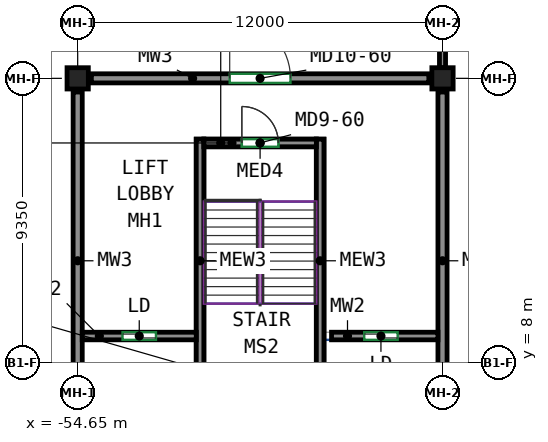
"""IFC4 building model, lengths in metres.
Left out: names, types, materials, properties, quantities, classifications, styles, units other than length and angle.
Written with IfcOpenShell. Run it as: python <this file> out.ifc"""

import sys

from ifc_helpers import new_model, si_unit, direction, frame, frame_2d, origin, origin_2d, place, context, subcontext, project, spatial, rectangle, extrude, source, transform, mapped, element, fill, save


model = new_model("IFC4")
c1 = context("Model", 3, precision=1e-05, world=origin(), true_north=direction((0.0, 1.0)))
c2 = subcontext(c1, "Body", "Model", "MODEL_VIEW")
j1 = project(units=[si_unit("LENGTHUNIT", "METRE"), si_unit("PLANEANGLEUNIT", "RADIAN")], contexts=[c1])
p1 = place(None, origin())
s1 = spatial("IfcSite", under=j1, at=p1, CompositionType="ELEMENT")
p2 = place(p1, origin())
s2 = spatial("IfcBuilding", under=s1, at=p2, CompositionType="ELEMENT")
p3 = place(p2, frame((0.0, 0.0, 22.5)))
s3 = spatial("IfcBuildingStorey", under=s2, at=p3, CompositionType="ELEMENT", Elevation=22.5)
m1 = source(origin(), c2, "Body", "SweptSolid", [
    extrude(rectangle(XDim=0.7, YDim=0.7, at=origin_2d()), origin(), (0.0, 0.0, 1.0), 4.22),
])
for number, where, z_axis, x_axis in (
    (1, (-54.65, 17.35, 0.0), (0.0, 0.0, 1.0), (1.0, 0.0, 0.0)),
    (2, (-42.65, 17.35, 0.0), (0.0, 0.0, 1.0), (1.0, 0.0, 0.0)),
):
    element("IfcColumn", number, at=place(p3, frame(where, z_axis=z_axis, x_axis=x_axis)), inside=s3, PredefinedType="COLUMN", context=c2, shape_type="MappedRepresentation", body=[
        mapped(m1, transform((0.0, 0.0, 0.0))),
    ])
m2 = source(origin(), c2, "Body", "SweptSolid", [
    extrude(rectangle(XDim=11.1, YDim=0.3, at=frame_2d((5.55, 0.0))), origin(), (0.0, 0.0, 1.0), 3.42),
])
p4 = place(p3, frame((-54.2, 17.35, 0.0), z_axis=(0.0, 0.0, 1.0), x_axis=(1.0, 0.0, 0.0)))
e3 = element("IfcWall", 3, at=p4, inside=s3, PredefinedType="SHEAR", context=c2, shape_type="MappedRepresentation", body=[
    mapped(m2, transform((0.0, 0.0, 0.0))),
])
p5 = place(p4, frame((4.55, 0.0, 0.0)))
e4 = element("IfcOpeningElement", 4, at=p5, cuts=e3, PredefinedType="OPENING", context=c2, shape_type="SweptSolid", body=[
    extrude(rectangle(XDim=2.0, YDim=2.4, at=frame_2d((1.0, 1.2))), frame((0.0, 0.16, 0.0), z_axis=(0.0, -1.0, 0.0), x_axis=(1.0, 0.0, 0.0)), (0.0, 0.0, 1.0), 0.32),
])
for number, where, z_axis, x_axis in (
    (5, (-54.65, 5.8, 0.0), (0.0, 0.0, 1.0), (0.0, 1.0, 0.0)),
    (6, (-42.65, 5.8, 0.0), (0.0, 0.0, 1.0), (0.0, 1.0, 0.0)),
):
    element("IfcWall", number, at=place(p3, frame(where, z_axis=z_axis, x_axis=x_axis)), inside=s3, PredefinedType="SHEAR", context=c2, shape_type="MappedRepresentation", body=[
        mapped(m2, transform((0.0, 0.0, 0.0))),
    ])
m3 = source(origin(), c2, "Body", "SweptSolid", [
    extrude(rectangle(XDim=9.85, YDim=0.25, at=frame_2d((4.925, 0.0))), origin(), (0.0, 0.0, 1.0), 4.22),
])
for number, where, z_axis, x_axis in (
    (7, (-50.625, 5.5, 0.0), (0.0, 0.0, 1.0), (0.0, 1.0, 0.0)),
    (8, (-46.675, 5.5, 0.0), (0.0, 0.0, 1.0), (0.0, 1.0, 0.0)),
):
    element("IfcWall", number, at=place(p3, frame(where, z_axis=z_axis, x_axis=x_axis)), inside=s3, PredefinedType="SHEAR", context=c2, shape_type="MappedRepresentation", body=[
        mapped(m3, transform((0.0, 0.0, 0.0))),
    ])
m4 = source(origin(), c2, "Body", "SweptSolid", [
    extrude(rectangle(XDim=3.7, YDim=0.25, at=frame_2d((1.85, 0.0))), origin(), (0.0, 0.0, 1.0), 4.22),
])
p6 = place(p3, frame((-50.5, 15.225, 0.0), z_axis=(0.0, 0.0, 1.0), x_axis=(1.0, 0.0, 0.0)))
e9 = element("IfcWall", 9, at=p6, inside=s3, PredefinedType="SHEAR", context=c2, shape_type="MappedRepresentation", body=[
    mapped(m4, transform((0.0, 0.0, 0.0))),
])
p7 = place(p6, frame((1.25, 0.0, 0.0)))
e10 = element("IfcOpeningElement", 10, at=p7, cuts=e9, PredefinedType="OPENING", context=c2, shape_type="SweptSolid", body=[
    extrude(rectangle(XDim=1.2, YDim=2.1, at=frame_2d((0.6, 1.05))), frame((0.0, 0.135, 0.0), z_axis=(0.0, -1.0, 0.0), x_axis=(1.0, 0.0, 0.0)), (0.0, 0.0, 1.0), 0.27),
])
m5 = source(origin(), c2, "Body", "SweptSolid", [
    extrude(rectangle(XDim=3.75, YDim=0.25, at=frame_2d((1.875, 0.0))), origin(), (0.0, 0.0, 1.0), 4.22),
])
p8 = place(p3, frame((-54.5, 8.875, 0.0), z_axis=(0.0, 0.0, 1.0), x_axis=(1.0, 0.0, 0.0)))
e11 = element("IfcWall", 11, at=p8, inside=s3, PredefinedType="SHEAR", context=c2, shape_type="MappedRepresentation", body=[
    mapped(m5, transform((0.0, 0.0, 0.0))),
])
p9 = place(p8, frame((1.325, 0.0, 0.0)))
e12 = element("IfcOpeningElement", 12, at=p9, cuts=e11, PredefinedType="OPENING", context=c2, shape_type="SweptSolid", body=[
    extrude(rectangle(XDim=1.1, YDim=2.1, at=frame_2d((0.55, 1.05))), frame((0.0, 0.135, 0.0), z_axis=(0.0, -1.0, 0.0), x_axis=(1.0, 0.0, 0.0)), (0.0, 0.0, 1.0), 0.27),
])
m6 = source(origin(), c2, "Body", "SweptSolid", [
    extrude(rectangle(XDim=3.5, YDim=0.25, at=frame_2d((1.75, 0.0))), origin(), (0.0, 0.0, 1.0), 4.22),
])
p10 = place(p3, frame((-46.3, 8.875, 0.0), z_axis=(0.0, 0.0, 1.0), x_axis=(1.0, 0.0, 0.0)))
e13 = element("IfcWall", 13, at=p10, inside=s3, PredefinedType="SHEAR", context=c2, shape_type="MappedRepresentation", body=[
    mapped(m6, transform((0.0, 0.0, 0.0))),
])
p11 = place(p10, frame((1.075, 0.0, 0.0)))
e14 = element("IfcOpeningElement", 14, at=p11, cuts=e13, PredefinedType="OPENING", context=c2, shape_type="SweptSolid", body=[
    extrude(rectangle(XDim=1.1, YDim=2.1, at=frame_2d((0.55, 1.05))), frame((0.0, 0.135, 0.0), z_axis=(0.0, -1.0, 0.0), x_axis=(1.0, 0.0, 0.0)), (0.0, 0.0, 1.0), 0.27),
])
m7 = source(origin(), c2, "Body", "SweptSolid", [
    extrude(rectangle(XDim=8.0, YDim=0.25, at=frame_2d((4.0, 0.0))), origin(), (0.0, 0.0, 1.0), 3.0),
])
for number, where, z_axis, x_axis in (
    (15, (-50.625, 7.35, 4.5), (0.0, 0.0, 1.0), (0.0, 1.0, 0.0)),
    (16, (-46.675, 7.35, 4.5), (0.0, 0.0, 1.0), (0.0, 1.0, 0.0)),
):
    element("IfcWall", number, at=place(p3, frame(where, z_axis=z_axis, x_axis=x_axis)), inside=s3, PredefinedType="SOLIDWALL", context=c2, shape_type="MappedRepresentation", body=[
        mapped(m7, transform((0.0, 0.0, 0.0))),
    ])
m8 = source(origin(), c2, "Body", "SweptSolid", [
    extrude(rectangle(XDim=3.7, YDim=0.25, at=frame_2d((1.85, 0.0))), origin(), (0.0, 0.0, 1.0), 3.0),
])
p12 = place(p3, frame((-50.5, 15.225, 4.5), z_axis=(0.0, 0.0, 1.0), x_axis=(1.0, 0.0, 0.0)))
e17 = element("IfcWall", 17, at=p12, inside=s3, PredefinedType="SOLIDWALL", context=c2, shape_type="MappedRepresentation", body=[
    mapped(m8, transform((0.0, 0.0, 0.0))),
])
p13 = place(p12, frame((1.25, 0.0, 0.0)))
e18 = element("IfcOpeningElement", 18, at=p13, cuts=e17, PredefinedType="OPENING", context=c2, shape_type="SweptSolid", body=[
    extrude(rectangle(XDim=1.2, YDim=2.1, at=frame_2d((0.6, 1.05))), frame((0.0, 0.135, 0.0), z_axis=(0.0, -1.0, 0.0), x_axis=(1.0, 0.0, 0.0)), (0.0, 0.0, 1.0), 0.27),
])
m9 = source(origin(), c2, "Body", "SweptSolid", [
    extrude(rectangle(XDim=10.35, YDim=0.2, at=frame_2d((5.175, 0.0))), origin(), (0.0, 0.0, 1.0), 3.42),
])
p14 = place(p3, frame((-42.65, 17.7, 0.0), z_axis=(0.0, 0.0, 1.0), x_axis=(0.0, 1.0, 0.0)))
e19 = element("IfcWall", 19, at=p14, inside=s3, PredefinedType="PARTITIONING", context=c2, shape_type="MappedRepresentation", body=[
    mapped(m9, transform((0.0, 0.0, 0.0))),
])
p15 = place(p14, frame((3.975, 0.0, 0.0)))
e20 = element("IfcOpeningElement", 20, at=p15, cuts=e19, PredefinedType="OPENING", context=c2, shape_type="SweptSolid", body=[
    extrude(rectangle(XDim=2.4, YDim=2.4, at=frame_2d((1.2, 1.2))), frame((0.0, 0.11, 0.0), z_axis=(0.0, -1.0, 0.0), x_axis=(1.0, 0.0, 0.0)), (0.0, 0.0, 1.0), 0.22),
])
p16 = place(p13, origin())
e21 = element("IfcDoor", 21, at=p16, inside=s3, OperationType="DOUBLE_DOOR_SINGLE_SWING", PredefinedType="DOOR", context=c2, shape_type="SweptSolid", body=[
    extrude(rectangle(XDim=1.2, YDim=2.1, at=frame_2d((0.6, 1.05))), frame((0.0, 0.025, 0.0), z_axis=(0.0, -1.0, 0.0), x_axis=(1.0, 0.0, 0.0)), (0.0, 0.0, 1.0), 0.05),
])
fill(e18, e21)
p17 = place(p7, origin())
e22 = element("IfcDoor", 22, at=p17, inside=s3, OperationType="DOUBLE_DOOR_SINGLE_SWING", PredefinedType="DOOR", context=c2, shape_type="SweptSolid", body=[
    extrude(rectangle(XDim=1.2, YDim=2.1, at=frame_2d((0.6, 1.05))), frame((0.0, 0.025, 0.0), z_axis=(0.0, -1.0, 0.0), x_axis=(1.0, 0.0, 0.0)), (0.0, 0.0, 1.0), 0.05),
])
fill(e10, e22)
p18 = place(p5, origin())
e23 = element("IfcDoor", 23, at=p18, inside=s3, OperationType="DOUBLE_DOOR_SINGLE_SWING", PredefinedType="DOOR", context=c2, shape_type="SweptSolid", body=[
    extrude(rectangle(XDim=2.0, YDim=2.4, at=frame_2d((1.0, 1.2))), frame((0.0, 0.025, 0.0), z_axis=(0.0, -1.0, 0.0), x_axis=(1.0, 0.0, 0.0)), (0.0, 0.0, 1.0), 0.05),
])
fill(e4, e23)
p19 = place(p9, origin())
e24 = element("IfcDoor", 24, at=p19, inside=s3, OperationType="SLIDING_TO_LEFT", PredefinedType="DOOR", context=c2, shape_type="SweptSolid", body=[
    extrude(rectangle(XDim=1.1, YDim=2.1, at=frame_2d((0.55, 1.05))), frame((0.0, 0.025, 0.0), z_axis=(0.0, -1.0, 0.0), x_axis=(1.0, 0.0, 0.0)), (0.0, 0.0, 1.0), 0.05),
])
fill(e12, e24)
p20 = place(p11, origin())
e25 = element("IfcDoor", 25, at=p20, inside=s3, OperationType="SLIDING_TO_LEFT", PredefinedType="DOOR", context=c2, shape_type="SweptSolid", body=[
    extrude(rectangle(XDim=1.1, YDim=2.1, at=frame_2d((0.55, 1.05))), frame((0.0, 0.025, 0.0), z_axis=(0.0, -1.0, 0.0), x_axis=(1.0, 0.0, 0.0)), (0.0, 0.0, 1.0), 0.05),
])
fill(e14, e25)
save(model, sys.argv[1])
